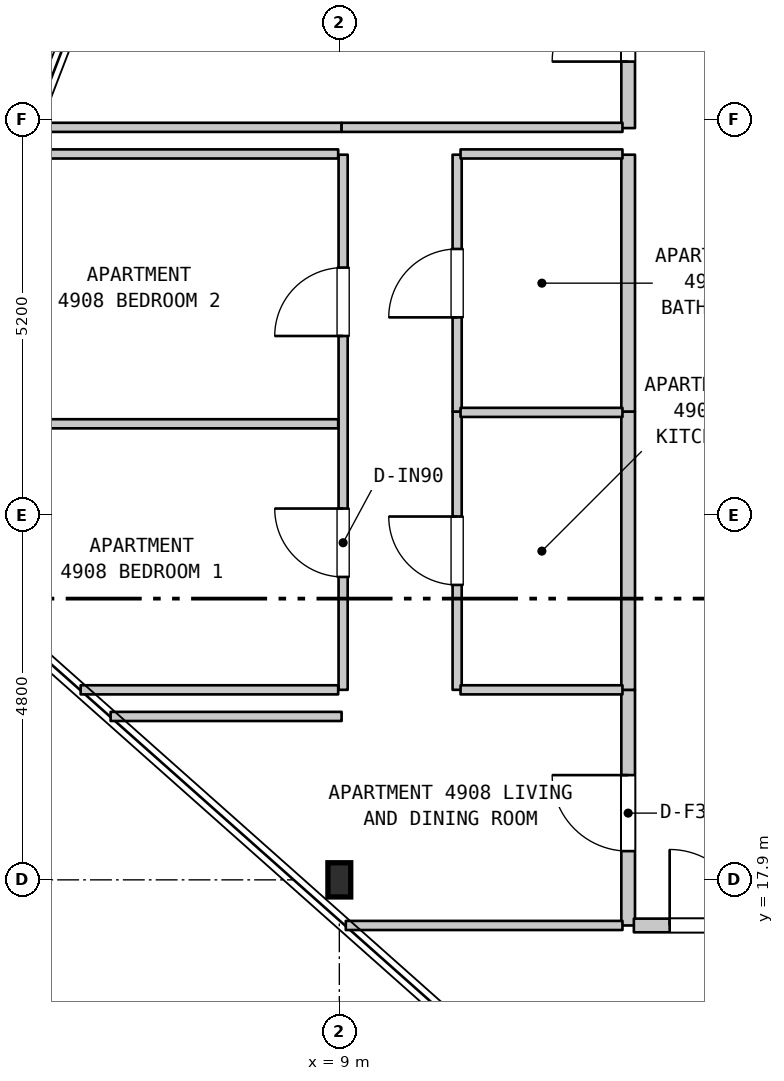
"""IFC4 building model, lengths in metres.
Left out: names, types, materials, properties, quantities, classifications, styles, units other than length and angle.
Written with IfcOpenShell. Run it as: python <this file> out.ifc"""

import sys

from ifc_helpers import new_model, si_unit, direction, frame, frame_2d, origin, origin_2d, place, context, subcontext, project, spatial, rectangle, i_section, extrude, element, fill, save


model = new_model("IFC4")
c1 = context("Model", 3, precision=1e-05, world=origin(), true_north=direction((0.0, 1.0)))
c2 = subcontext(c1, "Body", "Model", "MODEL_VIEW")
j1 = project(units=[si_unit("LENGTHUNIT", "METRE"), si_unit("PLANEANGLEUNIT", "RADIAN")], contexts=[c1])
p1 = place(None, origin())
s1 = spatial("IfcSite", under=j1, at=p1, CompositionType="ELEMENT")
p2 = place(p1, origin())
s2 = spatial("IfcBuilding", under=s1, at=p2, CompositionType="ELEMENT")
p3 = place(p2, frame((0.0, 0.0, 199.5)))
s3 = spatial("IfcBuildingStorey", under=s2, at=p3, CompositionType="ELEMENT", Elevation=199.5)
p4 = place(p3, frame((9.0, 17.9, 0.0), z_axis=(0.0, 0.0, 1.0), x_axis=(1.0, 0.0, 0.0)))
e1 = element("IfcColumn", 1, at=p4, inside=s3, PredefinedType="COLUMN", context=c2, shape_type="SweptSolid", body=[
    extrude(i_section(OverallWidth=0.3, OverallDepth=0.45, WebThickness=0.014, FlangeThickness=0.026, FilletRadius=0.027, at=origin_2d()), origin(), (0.0, 0.0, 1.0), 3.7),
])
p5 = place(p3, frame((9.05, 20.4, 0.0), z_axis=(0.0, 0.0, 1.0), x_axis=(0.0, 1.0, 0.0)))
e2 = element("IfcWall", 2, at=p5, inside=s3, PredefinedType="PARTITIONING", context=c2, shape_type="SweptSolid", body=[
    extrude(rectangle(XDim=7.04, YDim=0.12, at=frame_2d((3.52, 0.0))), origin(), (0.0, 0.0, 1.0), 2.79),
])
p6 = place(p5, frame((1.485, 0.0, 0.0)))
e3 = element("IfcOpeningElement", 3, at=p6, cuts=e2, PredefinedType="OPENING", context=c2, shape_type="SweptSolid", body=[
    extrude(rectangle(XDim=0.9, YDim=2.15, at=frame_2d((0.45, 1.075))), frame((0.0, 0.07, 0.0), z_axis=(0.0, -1.0, 0.0), x_axis=(1.0, 0.0, 0.0)), (0.0, 0.0, 1.0), 0.14),
])
p7 = place(p5, frame((4.655, 0.0, 0.0)))
e4 = element("IfcOpeningElement", 4, at=p7, cuts=e2, PredefinedType="OPENING", context=c2, shape_type="SweptSolid", body=[
    extrude(rectangle(XDim=0.9, YDim=2.15, at=frame_2d((0.45, 1.075))), frame((0.0, 0.07, 0.0), z_axis=(0.0, -1.0, 0.0), x_axis=(1.0, 0.0, 0.0)), (0.0, 0.0, 1.0), 0.14),
])
p8 = place(p3, frame((10.55, 20.4, 0.0), z_axis=(0.0, 0.0, 1.0), x_axis=(0.0, 1.0, 0.0)))
e5 = element("IfcWall", 5, at=p8, inside=s3, PredefinedType="PARTITIONING", context=c2, shape_type="SweptSolid", body=[
    extrude(rectangle(XDim=3.661, YDim=0.12, at=frame_2d((1.831, 0.0))), origin(), (0.0, 0.0, 1.0), 3.39),
])
p9 = place(p8, frame((1.38, 0.0, 0.0)))
e6 = element("IfcOpeningElement", 6, at=p9, cuts=e5, PredefinedType="OPENING", context=c2, shape_type="SweptSolid", body=[
    extrude(rectangle(XDim=0.9, YDim=2.15, at=frame_2d((0.45, 1.075))), frame((0.0, 0.07, 0.0), z_axis=(0.0, -1.0, 0.0), x_axis=(1.0, 0.0, 0.0)), (0.0, 0.0, 1.0), 0.14),
])
p10 = place(p3, frame((10.55, 24.061, 0.0), z_axis=(0.0, 0.0, 1.0), x_axis=(0.0, 1.0, 0.0)))
e7 = element("IfcWall", 7, at=p10, inside=s3, PredefinedType="PARTITIONING", context=c2, shape_type="SweptSolid", body=[
    extrude(rectangle(XDim=3.379, YDim=0.12, at=frame_2d((1.689, 0.0))), origin(), (0.0, 0.0, 1.0), 3.39),
])
p11 = place(p10, frame((1.239, 0.0, 0.0)))
e8 = element("IfcOpeningElement", 8, at=p11, cuts=e7, PredefinedType="OPENING", context=c2, shape_type="SweptSolid", body=[
    extrude(rectangle(XDim=0.9, YDim=2.1, at=frame_2d((0.45, 1.05))), frame((0.0, 0.07, 0.0), z_axis=(0.0, -1.0, 0.0), x_axis=(1.0, 0.0, 0.0)), (0.0, 0.0, 1.0), 0.14),
])
p12 = place(p3, frame((12.8, 17.3, 0.0), z_axis=(0.0, 0.0, 1.0), x_axis=(0.0, 1.0, 0.0)))
e9 = element("IfcWall", 9, at=p12, inside=s3, PredefinedType="STANDARD", context=c2, shape_type="SweptSolid", body=[
    extrude(rectangle(XDim=3.1, YDim=0.18, at=frame_2d((1.55, 0.0))), origin(), (0.0, 0.0, 1.0), 3.39),
])
p13 = place(p12, frame((0.978, 0.0, 0.0)))
e10 = element("IfcOpeningElement", 10, at=p13, cuts=e9, PredefinedType="OPENING", context=c2, shape_type="SweptSolid", body=[
    extrude(rectangle(XDim=1.0, YDim=2.15, at=frame_2d((0.5, 1.075))), frame((0.0, 0.1, 0.0), z_axis=(0.0, -1.0, 0.0), x_axis=(1.0, 0.0, 0.0)), (0.0, 0.0, 1.0), 0.2),
])
p14 = place(p3, frame((12.8, 20.4, 0.0), z_axis=(0.0, 0.0, 1.0), x_axis=(0.0, 1.0, 0.0)))
e11 = element("IfcWall", 11, at=p14, inside=s3, PredefinedType="STANDARD", context=c2, shape_type="SweptSolid", body=[
    extrude(rectangle(XDim=3.661, YDim=0.18, at=frame_2d((1.831, 0.0))), origin(), (0.0, 0.0, 1.0), 3.39),
])
p15 = place(p3, frame((12.8, 24.061, 0.0), z_axis=(0.0, 0.0, 1.0), x_axis=(0.0, 1.0, 0.0)))
e12 = element("IfcWall", 12, at=p15, inside=s3, PredefinedType="STANDARD", context=c2, shape_type="SweptSolid", body=[
    extrude(rectangle(XDim=3.379, YDim=0.18, at=frame_2d((1.689, 0.0))), origin(), (0.0, 0.0, 1.0), 3.39),
])
p16 = place(p3, frame((12.8, 27.79, 0.0), z_axis=(0.0, 0.0, 1.0), x_axis=(0.0, 1.0, 0.0)))
e13 = element("IfcWall", 13, at=p16, inside=s3, PredefinedType="STANDARD", context=c2, shape_type="SweptSolid", body=[
    extrude(rectangle(XDim=2.75, YDim=0.18, at=frame_2d((1.375, 0.0))), origin(), (0.0, 0.0, 1.0), 3.39),
])
p17 = place(p16, frame((0.875, 0.0, 0.0)))
e14 = element("IfcOpeningElement", 14, at=p17, cuts=e13, PredefinedType="OPENING", context=c2, shape_type="SweptSolid", body=[
    extrude(rectangle(XDim=1.0, YDim=2.15, at=frame_2d((0.5, 1.075))), frame((0.0, 0.1, 0.0), z_axis=(0.0, -1.0, 0.0), x_axis=(1.0, 0.0, 0.0)), (0.0, 0.0, 1.0), 0.2),
])
p18 = place(p3, frame((9.085, 17.3, 0.0), z_axis=(0.0, 0.0, 1.0), x_axis=(1.0, 0.0, 0.0)))
e15 = element("IfcWall", 15, at=p18, inside=s3, PredefinedType="PARTITIONING", context=c2, shape_type="SweptSolid", body=[
    extrude(rectangle(XDim=3.64, YDim=0.12, at=frame_2d((1.82, 0.0))), origin(), (0.0, 0.0, 1.0), 3.39),
])
p19 = place(p3, frame((12.875, 17.3, 0.0), z_axis=(0.0, 0.0, 1.0), x_axis=(1.0, 0.0, 0.0)))
e16 = element("IfcWall", 16, at=p19, inside=s3, PredefinedType="STANDARD", context=c2, shape_type="SweptSolid", body=[
    extrude(rectangle(XDim=3.28, YDim=0.18, at=frame_2d((1.64, 0.0))), origin(), (0.0, 0.0, 1.0), 3.39),
])
p20 = place(p19, frame((0.471, 0.0, 0.0)))
e17 = element("IfcOpeningElement", 17, at=p20, cuts=e16, PredefinedType="OPENING", context=c2, shape_type="SweptSolid", body=[
    extrude(rectangle(XDim=1.0, YDim=2.15, at=frame_2d((0.5, 1.075))), frame((0.0, 0.1, 0.0), z_axis=(0.0, -1.0, 0.0), x_axis=(1.0, 0.0, 0.0)), (0.0, 0.0, 1.0), 0.2),
])
p21 = place(p3, frame((5.991, 20.05, 0.0), z_axis=(0.0, 0.0, 1.0), x_axis=(1.0, 0.0, 0.0)))
e18 = element("IfcWall", 18, at=p21, inside=s3, PredefinedType="PARTITIONING", context=c2, shape_type="SweptSolid", body=[
    extrude(rectangle(XDim=3.039, YDim=0.12, at=frame_2d((1.52, 0.0))), origin(), (0.0, 0.0, 1.0), 3.39),
])
p22 = place(p3, frame((5.597, 20.4, 0.0), z_axis=(0.0, 0.0, 1.0), x_axis=(1.0, 0.0, 0.0)))
e19 = element("IfcWall", 19, at=p22, inside=s3, PredefinedType="PARTITIONING", context=c2, shape_type="SweptSolid", body=[
    extrude(rectangle(XDim=3.388, YDim=0.12, at=frame_2d((1.694, 0.0))), origin(), (0.0, 0.0, 1.0), 3.39),
])
p23 = place(p3, frame((10.595, 20.4, 0.0), z_axis=(0.0, 0.0, 1.0), x_axis=(1.0, 0.0, 0.0)))
e20 = element("IfcWall", 20, at=p23, inside=s3, PredefinedType="PARTITIONING", context=c2, shape_type="SweptSolid", body=[
    extrude(rectangle(XDim=2.13, YDim=0.12, at=frame_2d((1.065, 0.0))), origin(), (0.0, 0.0, 1.0), 3.39),
])
p24 = place(p3, frame((3.501, 23.9, 0.0), z_axis=(0.0, 0.0, 1.0), x_axis=(1.0, 0.0, 0.0)))
e21 = element("IfcWall", 21, at=p24, inside=s3, PredefinedType="PARTITIONING", context=c2, shape_type="SweptSolid", body=[
    extrude(rectangle(XDim=5.484, YDim=0.12, at=frame_2d((2.742, 0.0))), origin(), (0.0, 0.0, 1.0), 3.39),
])
p25 = place(p3, frame((10.595, 24.05, 0.0), z_axis=(0.0, 0.0, 1.0), x_axis=(1.0, 0.0, 0.0)))
e22 = element("IfcWall", 22, at=p25, inside=s3, PredefinedType="PARTITIONING", context=c2, shape_type="SweptSolid", body=[
    extrude(rectangle(XDim=2.13, YDim=0.12, at=frame_2d((1.065, 0.0))), origin(), (0.0, 0.0, 1.0), 3.39),
])
p26 = place(p3, frame((4.837, 27.45, 0.0), z_axis=(0.0, 0.0, 1.0), x_axis=(1.0, 0.0, 0.0)))
e23 = element("IfcWall", 23, at=p26, inside=s3, PredefinedType="PARTITIONING", context=c2, shape_type="SweptSolid", body=[
    extrude(rectangle(XDim=4.148, YDim=0.12, at=frame_2d((2.074, 0.0))), origin(), (0.0, 0.0, 1.0), 3.39),
])
p27 = place(p3, frame((10.595, 27.45, 0.0), z_axis=(0.0, 0.0, 1.0), x_axis=(1.0, 0.0, 0.0)))
e24 = element("IfcWall", 24, at=p27, inside=s3, PredefinedType="PARTITIONING", context=c2, shape_type="SweptSolid", body=[
    extrude(rectangle(XDim=2.13, YDim=0.12, at=frame_2d((1.065, 0.0))), origin(), (0.0, 0.0, 1.0), 3.39),
])
p28 = place(p3, frame((4.971, 27.8, 0.0), z_axis=(0.0, 0.0, 1.0), x_axis=(1.0, 0.0, 0.0)))
e25 = element("IfcWall", 25, at=p28, inside=s3, PredefinedType="PARTITIONING", context=c2, shape_type="SweptSolid", body=[
    extrude(rectangle(XDim=4.059, YDim=0.12, at=frame_2d((2.03, 0.0))), origin(), (0.0, 0.0, 1.0), 3.39),
])
p29 = place(p3, frame((9.03, 27.8, 0.0), z_axis=(0.0, 0.0, 1.0), x_axis=(1.0, 0.0, 0.0)))
e26 = element("IfcWall", 26, at=p29, inside=s3, PredefinedType="PARTITIONING", context=c2, shape_type="SweptSolid", body=[
    extrude(rectangle(XDim=3.695, YDim=0.12, at=frame_2d((1.848, 0.0))), origin(), (0.0, 0.0, 1.0), 3.39),
])
p30 = place(p6, origin())
e27 = element("IfcDoor", 27, at=p30, inside=s3, OperationType="SINGLE_SWING_RIGHT", PredefinedType="DOOR", context=c2, shape_type="SweptSolid", body=[
    extrude(rectangle(XDim=0.9, YDim=2.15, at=frame_2d((0.45, 1.075))), frame((0.0, 0.025, 0.0), z_axis=(0.0, -1.0, 0.0), x_axis=(1.0, 0.0, 0.0)), (0.0, 0.0, 1.0), 0.05),
])
fill(e3, e27)
p31 = place(p7, origin())
e28 = element("IfcDoor", 28, at=p31, inside=s3, OperationType="SINGLE_SWING_LEFT", PredefinedType="DOOR", context=c2, shape_type="SweptSolid", body=[
    extrude(rectangle(XDim=0.9, YDim=2.15, at=frame_2d((0.45, 1.075))), frame((0.0, 0.025, 0.0), z_axis=(0.0, -1.0, 0.0), x_axis=(1.0, 0.0, 0.0)), (0.0, 0.0, 1.0), 0.05),
])
fill(e4, e28)
p32 = place(p9, origin())
e29 = element("IfcDoor", 29, at=p32, inside=s3, OperationType="SINGLE_SWING_RIGHT", PredefinedType="DOOR", context=c2, shape_type="SweptSolid", body=[
    extrude(rectangle(XDim=0.9, YDim=2.15, at=frame_2d((0.45, 1.075))), frame((0.0, 0.025, 0.0), z_axis=(0.0, -1.0, 0.0), x_axis=(1.0, 0.0, 0.0)), (0.0, 0.0, 1.0), 0.05),
])
fill(e6, e29)
p33 = place(p11, origin())
e30 = element("IfcDoor", 30, at=p33, inside=s3, OperationType="SINGLE_SWING_LEFT", PredefinedType="DOOR", context=c2, shape_type="SweptSolid", body=[
    extrude(rectangle(XDim=0.9, YDim=2.1, at=frame_2d((0.45, 1.05))), frame((0.0, 0.025, 0.0), z_axis=(0.0, -1.0, 0.0), x_axis=(1.0, 0.0, 0.0)), (0.0, 0.0, 1.0), 0.05),
])
fill(e8, e30)
p34 = place(p13, origin())
e31 = element("IfcDoor", 31, at=p34, inside=s3, OperationType="SINGLE_SWING_RIGHT", PredefinedType="DOOR", context=c2, shape_type="SweptSolid", body=[
    extrude(rectangle(XDim=1.0, YDim=2.15, at=frame_2d((0.5, 1.075))), frame((0.0, 0.025, 0.0), z_axis=(0.0, -1.0, 0.0), x_axis=(1.0, 0.0, 0.0)), (0.0, 0.0, 1.0), 0.05),
])
fill(e10, e31)
p35 = place(p17, origin())
e32 = element("IfcDoor", 32, at=p35, inside=s3, OperationType="SINGLE_SWING_LEFT", PredefinedType="DOOR", context=c2, shape_type="SweptSolid", body=[
    extrude(rectangle(XDim=1.0, YDim=2.15, at=frame_2d((0.5, 1.075))), frame((0.0, 0.025, 0.0), z_axis=(0.0, -1.0, 0.0), x_axis=(1.0, 0.0, 0.0)), (0.0, 0.0, 1.0), 0.05),
])
fill(e14, e32)
p36 = place(p20, origin())
e33 = element("IfcDoor", 33, at=p36, inside=s3, OperationType="SINGLE_SWING_LEFT", PredefinedType="DOOR", context=c2, shape_type="SweptSolid", body=[
    extrude(rectangle(XDim=1.0, YDim=2.15, at=frame_2d((0.5, 1.075))), frame((0.0, 0.025, 0.0), z_axis=(0.0, -1.0, 0.0), x_axis=(1.0, 0.0, 0.0)), (0.0, 0.0, 1.0), 0.05),
])
fill(e17, e33)
save(model, sys.argv[1])
